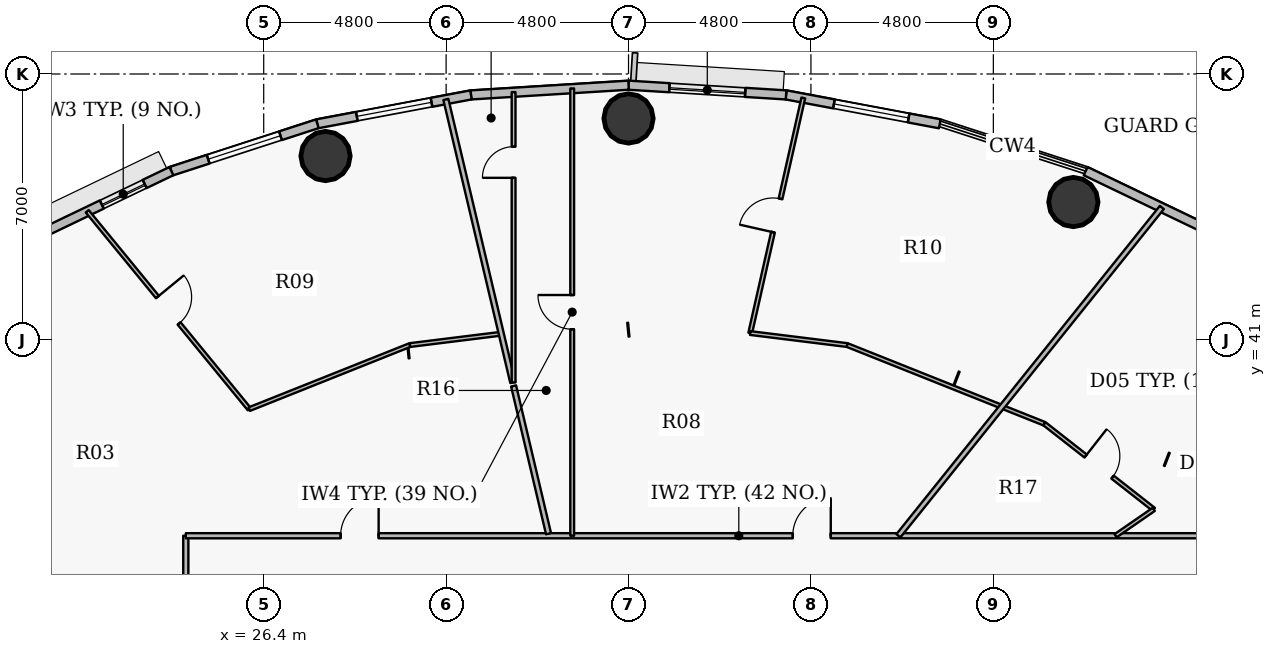
"""IFC4 building model, lengths in metres.
Left out: names, types, materials, properties, quantities, classifications, styles, units other than length and angle.
Written with IfcOpenShell. Run it as: python <this file> out.ifc"""

import sys

from ifc_helpers import new_model, si_unit, direction, frame, frame_2d, origin, origin_2d, place, context, subcontext, project, spatial, rectangle, hollow_circle, extrude, source, transform, mapped, element, fill, save


model = new_model("IFC4")
c1 = context("Model", 3, precision=1e-05, world=origin(), true_north=direction((0.0, 1.0)))
c2 = subcontext(c1, "Body", "Model", "MODEL_VIEW")
j1 = project(units=[si_unit("LENGTHUNIT", "METRE"), si_unit("PLANEANGLEUNIT", "RADIAN")], contexts=[c1])
p1 = place(None, origin())
s1 = spatial("IfcSite", under=j1, at=p1, CompositionType="ELEMENT")
p2 = place(p1, origin())
s2 = spatial("IfcBuilding", under=s1, at=p2, CompositionType="ELEMENT")
p3 = place(p2, frame((0.0, 0.0, 156.15)))
s3 = spatial("IfcBuildingStorey", under=s2, at=p3, CompositionType="ELEMENT", Elevation=156.15)
for number, where, z_axis, x_axis in (
    (1, (47.706, 44.631, 0.0), (0.0, 0.0, 1.0), (1.0, 0.0, 0.0)),
    (2, (36.0, 46.83, 0.0), (0.0, 0.0, 1.0), (1.0, 0.0, 0.0)),
    (3, (28.027, 45.841, 0.0), (0.0, 0.0, 1.0), (1.0, 0.0, 0.0)),
):
    element("IfcColumn", number, at=place(p3, frame(where, z_axis=z_axis, x_axis=x_axis)), inside=s3, PredefinedType="COLUMN", context=c2, shape_type="SweptSolid", body=[
        extrude(hollow_circle(Radius=0.65, WallThickness=0.04, at=origin_2d()), origin(), (0.0, 0.0, 1.0), 3.75),
    ])
p4 = place(p3, frame((48.03, 45.444, 0.0), z_axis=(0.0, 0.0, 1.0), x_axis=(0.901564733809, -0.432644231155, 0.0)))
e4 = element("IfcWall", 4, at=p4, inside=s3, PredefinedType="SOLIDWALL", context=c2, shape_type="SweptSolid", body=[
    extrude(rectangle(XDim=3.93, YDim=0.24, at=frame_2d((1.965, 0.0))), origin(), (0.0, 0.0, 1.0), 3.5),
])
p5 = place(p3, frame((40.146, 47.449, 0.0), z_axis=(0.0, 0.0, 1.0), x_axis=(0.982788108205, -0.184736391573, 0.0)))
e5 = element("IfcWall", 5, at=p5, inside=s3, PredefinedType="SOLIDWALL", context=c2, shape_type="SweptSolid", body=[
    extrude(rectangle(XDim=4.114, YDim=0.24, at=frame_2d((2.057, 0.0))), origin(), (0.0, 0.0, 1.0), 3.5),
])
p6 = place(p5, frame((1.281, 0.0, 0.9)))
e6 = element("IfcOpeningElement", 6, at=p6, cuts=e5, PredefinedType="OPENING", context=c2, shape_type="SweptSolid", body=[
    extrude(rectangle(XDim=2.0, YDim=1.75, at=origin_2d()), frame((1.0, 0.13, 0.875), z_axis=(0.0, -1.0, 0.0), x_axis=(1.0, 0.0, 0.0)), (0.0, 0.0, 1.0), 0.26),
])
p7 = place(p3, frame((36.0, 47.705, 0.0), z_axis=(0.0, 0.0, 1.0), x_axis=(0.998104600619, -0.061540281305, 0.0)))
e7 = element("IfcWall", 7, at=p7, inside=s3, PredefinedType="SOLIDWALL", context=c2, shape_type="SweptSolid", body=[
    extrude(rectangle(XDim=4.154, YDim=0.24, at=frame_2d((2.077, 0.0))), origin(), (0.0, 0.0, 1.0), 3.5),
])
p8 = place(p7, frame((1.077, 0.0, 0.9)))
e8 = element("IfcOpeningElement", 8, at=p8, cuts=e7, PredefinedType="OPENING", context=c2, shape_type="SweptSolid", body=[
    extrude(rectangle(XDim=2.0, YDim=1.75, at=origin_2d()), frame((1.0, 0.13, 0.875), z_axis=(0.0, -1.0, 0.0), x_axis=(1.0, 0.0, 0.0)), (0.0, 0.0, 1.0), 0.26),
])
p9 = place(p3, frame((31.854, 47.449, 0.0), z_axis=(0.0, 0.0, 1.0), x_axis=(0.998104600619, 0.061540281305, 0.0)))
e9 = element("IfcWall", 9, at=p9, inside=s3, PredefinedType="SOLIDWALL", context=c2, shape_type="SweptSolid", body=[
    extrude(rectangle(XDim=4.154, YDim=0.24, at=frame_2d((2.077, 0.0))), origin(), (0.0, 0.0, 1.0), 3.5),
])
p10 = place(p3, frame((27.811, 46.689, 0.0), z_axis=(0.0, 0.0, 1.0), x_axis=(0.982788108205, 0.184736391573, 0.0)))
e10 = element("IfcWall", 10, at=p10, inside=s3, PredefinedType="SOLIDWALL", context=c2, shape_type="SweptSolid", body=[
    extrude(rectangle(XDim=4.114, YDim=0.24, at=frame_2d((2.057, 0.0))), origin(), (0.0, 0.0, 1.0), 3.5),
])
p11 = place(p10, frame((1.057, 0.0, 0.9)))
e11 = element("IfcOpeningElement", 11, at=p11, cuts=e10, PredefinedType="OPENING", context=c2, shape_type="SweptSolid", body=[
    extrude(rectangle(XDim=2.0, YDim=1.75, at=origin_2d()), frame((1.0, 0.13, 0.875), z_axis=(0.0, -1.0, 0.0), x_axis=(1.0, 0.0, 0.0)), (0.0, 0.0, 1.0), 0.26),
])
p12 = place(p3, frame((23.97, 45.444, 0.0), z_axis=(0.0, 0.0, 1.0), x_axis=(0.951209870236, 0.30854462038, 0.0)))
e12 = element("IfcWall", 12, at=p12, inside=s3, PredefinedType="SOLIDWALL", context=c2, shape_type="SweptSolid", body=[
    extrude(rectangle(XDim=4.038, YDim=0.24, at=frame_2d((2.019, 0.0))), origin(), (0.0, 0.0, 1.0), 3.5),
])
p13 = place(p12, frame((1.019, 0.0, 0.9)))
e13 = element("IfcOpeningElement", 13, at=p13, cuts=e12, PredefinedType="OPENING", context=c2, shape_type="SweptSolid", body=[
    extrude(rectangle(XDim=2.0, YDim=1.75, at=origin_2d()), frame((1.0, 0.13, 0.875), z_axis=(0.0, -1.0, 0.0), x_axis=(1.0, 0.0, 0.0)), (0.0, 0.0, 1.0), 0.26),
])
p14 = place(p3, frame((20.427, 43.743, 0.0), z_axis=(0.0, 0.0, 1.0), x_axis=(0.901564733809, 0.432644231155, 0.0)))
e14 = element("IfcWall", 14, at=p14, inside=s3, PredefinedType="SOLIDWALL", context=c2, shape_type="SweptSolid", body=[
    extrude(rectangle(XDim=3.93, YDim=0.24, at=frame_2d((1.965, 0.0))), origin(), (0.0, 0.0, 1.0), 3.5),
])
p15 = place(p14, frame((1.9, 0.0, 0.9)))
e15 = element("IfcOpeningElement", 15, at=p15, cuts=e14, PredefinedType="OPENING", context=c2, shape_type="SweptSolid", body=[
    extrude(rectangle(XDim=1.25, YDim=1.65, at=origin_2d()), frame((0.625, 0.13, 0.825), z_axis=(0.0, -1.0, 0.0), x_axis=(1.0, 0.0, 0.0)), (0.0, 0.0, 1.0), 0.26),
])
p16 = place(p3, frame((13.229, 37.45, 0.0), z_axis=(0.0, 0.0, 1.0), x_axis=(0.908867611309, -0.417084721746, 0.0)))
e16 = element("IfcWall", 16, at=p16, inside=s3, PredefinedType="PARTITIONING", context=c2, shape_type="SweptSolid", body=[
    extrude(rectangle(XDim=12.237, YDim=0.135, at=frame_2d((6.118, 0.0))), origin(), (0.0, 0.0, 1.0), 2.935),
])
p17 = place(p3, frame((21.756, 44.387, 0.0), z_axis=(0.0, 0.0, 1.0), x_axis=(0.633727642201, -0.773556252325, 0.0)))
e17 = element("IfcWall", 17, at=p17, inside=s3, PredefinedType="PARTITIONING", context=c2, shape_type="SweptSolid", body=[
    extrude(rectangle(XDim=6.729, YDim=0.1, at=frame_2d((3.365, 0.0))), origin(), (0.0, 0.0, 1.0), 2.935),
])
p18 = place(p17, frame((2.915, 0.0, 0.0)))
e18 = element("IfcOpeningElement", 18, at=p18, cuts=e17, PredefinedType="OPENING", context=c2, shape_type="SweptSolid", body=[
    extrude(rectangle(XDim=0.9, YDim=2.1, at=origin_2d()), frame((0.45, 0.06, 1.05), z_axis=(0.0, -1.0, 0.0), x_axis=(1.0, 0.0, 0.0)), (0.0, 0.0, 1.0), 0.12),
])
p19 = place(p3, frame((24.35, 27.95, 0.0), z_axis=(0.0, 0.0, 1.0), x_axis=(0.0, 1.0, 0.0)))
e19 = element("IfcWall", 19, at=p19, inside=s3, PredefinedType="PARTITIONING", context=c2, shape_type="SweptSolid", body=[
    extrude(rectangle(XDim=7.9, YDim=0.135, at=frame_2d((3.95, 0.0))), origin(), (0.0, 0.0, 1.0), 2.935),
])
p20 = place(p3, frame((24.35, 35.85, 0.0), z_axis=(0.0, 0.0, 1.0), x_axis=(1.0, 0.0, 0.0)))
e20 = element("IfcWall", 20, at=p20, inside=s3, PredefinedType="PARTITIONING", context=c2, shape_type="SweptSolid", body=[
    extrude(rectangle(XDim=29.104, YDim=0.135, at=frame_2d((14.552, 0.0))), origin(), (0.0, 0.0, 1.0), 2.935),
])
p21 = place(p20, frame((15.972, 0.0, 0.0)))
e21 = element("IfcOpeningElement", 21, at=p21, cuts=e20, PredefinedType="OPENING", context=c2, shape_type="SweptSolid", body=[
    extrude(rectangle(XDim=1.0, YDim=2.15, at=origin_2d()), frame((0.5, 0.078, 1.075), z_axis=(0.0, -1.0, 0.0), x_axis=(1.0, 0.0, 0.0)), (0.0, 0.0, 1.0), 0.155),
])
p22 = place(p20, frame((4.074, 0.0, 0.0)))
e22 = element("IfcOpeningElement", 22, at=p22, cuts=e20, PredefinedType="OPENING", context=c2, shape_type="SweptSolid", body=[
    extrude(rectangle(XDim=1.0, YDim=2.15, at=origin_2d()), frame((0.5, 0.078, 1.075), z_axis=(0.0, -1.0, 0.0), x_axis=(1.0, 0.0, 0.0)), (0.0, 0.0, 1.0), 0.155),
])
p23 = place(p3, frame((26.021, 39.181, 0.0), z_axis=(0.0, 0.0, 1.0), x_axis=(0.928787254853, 0.37061332305, 0.0)))
e23 = element("IfcWall", 23, at=p23, inside=s3, PredefinedType="PARTITIONING", context=c2, shape_type="SweptSolid", body=[
    extrude(rectangle(XDim=4.549, YDim=0.1, at=frame_2d((2.275, 0.0))), origin(), (0.0, 0.0, 1.0), 2.935),
])
p24 = place(p3, frame((30.246, 40.867, 0.0), z_axis=(0.0, 0.0, 1.0), x_axis=(0.99240598239, 0.123005553192, 0.0)))
e24 = element("IfcWall", 24, at=p24, inside=s3, PredefinedType="PARTITIONING", context=c2, shape_type="SweptSolid", body=[
    extrude(rectangle(XDim=2.423, YDim=0.1, at=frame_2d((1.212, 0.0))), origin(), (0.0, 0.0, 1.0), 2.935),
])
p25 = place(p3, frame((31.194, 47.33, 0.0), z_axis=(0.0, 0.0, 1.0), x_axis=(0.230064999041, -0.973175264902, 0.0)))
e25 = element("IfcWall", 25, at=p25, inside=s3, PredefinedType="PARTITIONING", context=c2, shape_type="SweptSolid", body=[
    extrude(rectangle(XDim=7.654, YDim=0.135, at=frame_2d((3.827, 0.0))), origin(), (0.0, 0.0, 1.0), 2.935),
])
p26 = place(p3, frame((32.976, 39.792, 0.0), z_axis=(0.0, 0.0, 1.0), x_axis=(0.230050705958, -0.973178643769, 0.0)))
e26 = element("IfcWall", 26, at=p26, inside=s3, PredefinedType="PARTITIONING", context=c2, shape_type="SweptSolid", body=[
    extrude(rectangle(XDim=3.996, YDim=0.135, at=frame_2d((1.998, 0.0))), origin(), (0.0, 0.0, 1.0), 3.5),
])
p27 = place(p3, frame((32.976, 39.884, 0.0), z_axis=(0.0, 0.0, 1.0), x_axis=(0.0, 1.0, 0.0)))
e27 = element("IfcWall", 27, at=p27, inside=s3, PredefinedType="PARTITIONING", context=c2, shape_type="SweptSolid", body=[
    extrude(rectangle(XDim=7.64, YDim=0.1, at=frame_2d((3.82, 0.0))), origin(), (0.0, 0.0, 1.0), 2.935),
])
p28 = place(p27, frame((5.384, 0.0, 0.0)))
e28 = element("IfcOpeningElement", 28, at=p28, cuts=e27, PredefinedType="OPENING", context=c2, shape_type="SweptSolid", body=[
    extrude(rectangle(XDim=0.82, YDim=2.1, at=origin_2d()), frame((0.41, 0.06, 1.05), z_axis=(0.0, -1.0, 0.0), x_axis=(1.0, 0.0, 0.0)), (0.0, 0.0, 1.0), 0.12),
])
p29 = place(p3, frame((34.518, 35.85, 0.0), z_axis=(0.0, 0.0, 1.0), x_axis=(0.0, 1.0, 0.0)))
e29 = element("IfcWall", 29, at=p29, inside=s3, PredefinedType="PARTITIONING", context=c2, shape_type="SweptSolid", body=[
    extrude(rectangle(XDim=11.769, YDim=0.1, at=frame_2d((5.884, 0.0))), origin(), (0.0, 0.0, 1.0), 2.935),
])
p30 = place(p29, frame((5.434, 0.0, 0.0)))
e30 = element("IfcOpeningElement", 30, at=p30, cuts=e29, PredefinedType="OPENING", context=c2, shape_type="SweptSolid", body=[
    extrude(rectangle(XDim=0.9, YDim=2.1, at=origin_2d()), frame((0.45, 0.06, 1.05), z_axis=(0.0, -1.0, 0.0), x_axis=(1.0, 0.0, 0.0)), (0.0, 0.0, 1.0), 0.12),
])
p31 = place(p3, frame((39.202, 41.184, 0.0), z_axis=(0.0, 0.0, 1.0), x_axis=(0.220223056883, 0.975449540067, 0.0)))
e31 = element("IfcWall", 31, at=p31, inside=s3, PredefinedType="PARTITIONING", context=c2, shape_type="SweptSolid", body=[
    extrude(rectangle(XDim=6.341, YDim=0.1, at=frame_2d((3.171, 0.0))), origin(), (0.0, 0.0, 1.0), 2.935),
])
p32 = place(p31, frame((2.721, 0.0, 0.0)))
e32 = element("IfcOpeningElement", 32, at=p32, cuts=e31, PredefinedType="OPENING", context=c2, shape_type="SweptSolid", body=[
    extrude(rectangle(XDim=0.9, YDim=2.1, at=origin_2d()), frame((0.45, 0.06, 1.05), z_axis=(0.0, -1.0, 0.0), x_axis=(1.0, 0.0, 0.0)), (0.0, 0.0, 1.0), 0.12),
])
p33 = place(p3, frame((39.202, 41.184, 0.0), z_axis=(0.0, 0.0, 1.0), x_axis=(0.992398655735, -0.123064650065, 0.0)))
e33 = element("IfcWall", 33, at=p33, inside=s3, PredefinedType="PARTITIONING", context=c2, shape_type="SweptSolid", body=[
    extrude(rectangle(XDim=2.571, YDim=0.1, at=frame_2d((1.286, 0.0))), origin(), (0.0, 0.0, 1.0), 3.5),
])
p34 = place(p3, frame((41.754, 40.867, 0.0), z_axis=(0.0, 0.0, 1.0), x_axis=(0.928789673623, -0.370607261359, 0.0)))
e34 = element("IfcWall", 34, at=p34, inside=s3, PredefinedType="PARTITIONING", context=c2, shape_type="SweptSolid", body=[
    extrude(rectangle(XDim=5.589, YDim=0.1, at=frame_2d((2.794, 0.0))), origin(), (0.0, 0.0, 1.0), 2.935),
])
p35 = place(p3, frame((43.102, 35.85, 0.0), z_axis=(0.0, 0.0, 1.0), x_axis=(0.62588794771, 0.779912993168, 0.0)))
e35 = element("IfcWall", 35, at=p35, inside=s3, PredefinedType="PARTITIONING", context=c2, shape_type="SweptSolid", body=[
    extrude(rectangle(XDim=11.075, YDim=0.135, at=frame_2d((5.538, 0.0))), origin(), (0.0, 0.0, 1.0), 2.935),
])
p36 = place(p3, frame((46.71, 30.48, 0.0), z_axis=(0.0, 0.0, 1.0), x_axis=(0.951054665008, 0.309022691992, 0.0)))
e36 = element("IfcWall", 36, at=p36, inside=s3, PredefinedType="PARTITIONING", context=c2, shape_type="SweptSolid", body=[
    extrude(rectangle(XDim=14.372, YDim=0.135, at=frame_2d((7.186, 0.0))), origin(), (0.0, 0.0, 1.0), 2.935),
])
p37 = place(p3, frame((46.945, 38.796, 0.0), z_axis=(0.0, 0.0, 1.0), x_axis=(0.787307530322, -0.616560502058, 0.0)))
e37 = element("IfcWall", 37, at=p37, inside=s3, PredefinedType="PARTITIONING", context=c2, shape_type="SweptSolid", body=[
    extrude(rectangle(XDim=3.653, YDim=0.1, at=frame_2d((1.827, 0.0))), origin(), (0.0, 0.0, 1.0), 2.935),
])
p38 = place(p37, frame((1.377, 0.0, 0.0)))
e38 = element("IfcOpeningElement", 38, at=p38, cuts=e37, PredefinedType="OPENING", context=c2, shape_type="SweptSolid", body=[
    extrude(rectangle(XDim=0.9, YDim=2.1, at=origin_2d()), frame((0.45, 0.06, 1.05), z_axis=(0.0, -1.0, 0.0), x_axis=(1.0, 0.0, 0.0)), (0.0, 0.0, 1.0), 0.12),
])
p39 = place(p3, frame((48.816, 35.85, 0.0), z_axis=(0.0, 0.0, 1.0), x_axis=(0.822832340307, 0.568284206841, 0.0)))
e39 = element("IfcWall", 39, at=p39, inside=s3, PredefinedType="PARTITIONING", context=c2, shape_type="SweptSolid", body=[
    extrude(rectangle(XDim=1.221, YDim=0.1, at=frame_2d((0.61, 0.0))), origin(), (0.0, 0.0, 1.0), 3.185),
])
m1 = source(origin(), c2, "Body", "SweptSolid", [
    extrude(rectangle(XDim=2.0, YDim=1.75, at=origin_2d()), frame((1.0, 0.03, 0.875), z_axis=(0.0, -1.0, 0.0), x_axis=(1.0, 0.0, 0.0)), (0.0, 0.0, 1.0), 0.06),
])
p40 = place(p6, origin())
e40 = element("IfcWindow", 40, at=p40, inside=s3, PartitioningType="DOUBLE_PANEL_VERTICAL", PredefinedType="WINDOW", context=c2, shape_type="MappedRepresentation", body=[
    mapped(m1, transform((0.0, 0.0, 0.0), x_axis=(1.0, 0.0, 0.0), y_axis=(0.0, 1.0, 0.0), z_axis=(0.0, 0.0, 1.0), scale=1.0)),
])
fill(e6, e40)
p41 = place(p8, origin())
e41 = element("IfcWindow", 41, at=p41, inside=s3, PartitioningType="DOUBLE_PANEL_VERTICAL", PredefinedType="WINDOW", context=c2, shape_type="MappedRepresentation", body=[
    mapped(m1, transform((0.0, 0.0, 0.0), x_axis=(1.0, 0.0, 0.0), y_axis=(0.0, 1.0, 0.0), z_axis=(0.0, 0.0, 1.0), scale=1.0)),
])
fill(e8, e41)
p42 = place(p11, origin())
e42 = element("IfcWindow", 42, at=p42, inside=s3, PartitioningType="DOUBLE_PANEL_VERTICAL", PredefinedType="WINDOW", context=c2, shape_type="MappedRepresentation", body=[
    mapped(m1, transform((0.0, 0.0, 0.0), x_axis=(1.0, 0.0, 0.0), y_axis=(0.0, 1.0, 0.0), z_axis=(0.0, 0.0, 1.0), scale=1.0)),
])
fill(e11, e42)
p43 = place(p13, origin())
e43 = element("IfcWindow", 43, at=p43, inside=s3, PartitioningType="DOUBLE_PANEL_VERTICAL", PredefinedType="WINDOW", context=c2, shape_type="MappedRepresentation", body=[
    mapped(m1, transform((0.0, 0.0, 0.0), x_axis=(1.0, 0.0, 0.0), y_axis=(0.0, 1.0, 0.0), z_axis=(0.0, 0.0, 1.0), scale=1.0)),
])
fill(e13, e43)
m2 = source(origin(), c2, "Body", "SweptSolid", [
    extrude(rectangle(XDim=1.25, YDim=1.65, at=origin_2d()), frame((0.625, 0.03, 0.825), z_axis=(0.0, -1.0, 0.0), x_axis=(1.0, 0.0, 0.0)), (0.0, 0.0, 1.0), 0.06),
])
p44 = place(p15, origin())
e44 = element("IfcWindow", 44, at=p44, inside=s3, PartitioningType="SINGLE_PANEL", PredefinedType="WINDOW", context=c2, shape_type="MappedRepresentation", body=[
    mapped(m2, transform((0.0, 0.0, 0.0), x_axis=(1.0, 0.0, 0.0), y_axis=(0.0, 1.0, 0.0), z_axis=(0.0, 0.0, 1.0), scale=1.0)),
])
fill(e15, e44)
m3 = source(origin(), c2, "Body", "SweptSolid", [
    extrude(rectangle(XDim=0.9, YDim=2.1, at=origin_2d()), frame((0.45, 0.025, 1.05), z_axis=(0.0, -1.0, 0.0), x_axis=(1.0, 0.0, 0.0)), (0.0, 0.0, 1.0), 0.05),
])
p45 = place(p38, origin())
e45 = element("IfcDoor", 45, at=p45, inside=s3, OperationType="SINGLE_SWING_LEFT", PredefinedType="DOOR", context=c2, shape_type="MappedRepresentation", body=[
    mapped(m3, transform((0.0, 0.0, 0.0), x_axis=(1.0, 0.0, 0.0), y_axis=(0.0, 1.0, 0.0), z_axis=(0.0, 0.0, 1.0), scale=1.0)),
])
fill(e38, e45)
m4 = source(origin(), c2, "Body", "SweptSolid", [
    extrude(rectangle(XDim=1.0, YDim=2.15, at=origin_2d()), frame((0.5, 0.025, 1.075), z_axis=(0.0, -1.0, 0.0), x_axis=(1.0, 0.0, 0.0)), (0.0, 0.0, 1.0), 0.05),
])
p46 = place(p21, origin())
e46 = element("IfcDoor", 46, at=p46, inside=s3, OperationType="SINGLE_SWING_RIGHT", PredefinedType="DOOR", context=c2, shape_type="MappedRepresentation", body=[
    mapped(m4, transform((0.0, 0.0, 0.0), x_axis=(1.0, 0.0, 0.0), y_axis=(0.0, 1.0, 0.0), z_axis=(0.0, 0.0, 1.0), scale=1.0)),
])
fill(e21, e46)
p47 = place(p32, origin())
e47 = element("IfcDoor", 47, at=p47, inside=s3, OperationType="SINGLE_SWING_LEFT", PredefinedType="DOOR", context=c2, shape_type="MappedRepresentation", body=[
    mapped(m3, transform((0.0, 0.0, 0.0), x_axis=(1.0, 0.0, 0.0), y_axis=(0.0, 1.0, 0.0), z_axis=(0.0, 0.0, 1.0), scale=1.0)),
])
fill(e32, e47)
p48 = place(p30, origin())
e48 = element("IfcDoor", 48, at=p48, inside=s3, OperationType="SINGLE_SWING_RIGHT", PredefinedType="DOOR", context=c2, shape_type="MappedRepresentation", body=[
    mapped(m3, transform((0.0, 0.0, 0.0), x_axis=(1.0, 0.0, 0.0), y_axis=(0.0, 1.0, 0.0), z_axis=(0.0, 0.0, 1.0), scale=1.0)),
])
fill(e30, e48)
m5 = source(origin(), c2, "Body", "SweptSolid", [
    extrude(rectangle(XDim=0.82, YDim=2.1, at=origin_2d()), frame((0.41, 0.025, 1.05), z_axis=(0.0, -1.0, 0.0), x_axis=(1.0, 0.0, 0.0)), (0.0, 0.0, 1.0), 0.05),
])
p49 = place(p28, origin())
e49 = element("IfcDoor", 49, at=p49, inside=s3, OperationType="SINGLE_SWING_LEFT", PredefinedType="DOOR", context=c2, shape_type="MappedRepresentation", body=[
    mapped(m5, transform((0.0, 0.0, 0.0), x_axis=(1.0, 0.0, 0.0), y_axis=(0.0, 1.0, 0.0), z_axis=(0.0, 0.0, 1.0), scale=1.0)),
])
fill(e28, e49)
p50 = place(p22, origin())
e50 = element("IfcDoor", 50, at=p50, inside=s3, OperationType="SINGLE_SWING_RIGHT", PredefinedType="DOOR", context=c2, shape_type="MappedRepresentation", body=[
    mapped(m4, transform((0.0, 0.0, 0.0), x_axis=(1.0, 0.0, 0.0), y_axis=(0.0, 1.0, 0.0), z_axis=(0.0, 0.0, 1.0), scale=1.0)),
])
fill(e22, e50)
p51 = place(p18, origin())
e51 = element("IfcDoor", 51, at=p51, inside=s3, OperationType="SINGLE_SWING_LEFT", PredefinedType="DOOR", context=c2, shape_type="MappedRepresentation", body=[
    mapped(m3, transform((0.0, 0.0, 0.0), x_axis=(1.0, 0.0, 0.0), y_axis=(0.0, 1.0, 0.0), z_axis=(0.0, 0.0, 1.0), scale=1.0)),
])
fill(e18, e51)
save(model, sys.argv[1])
